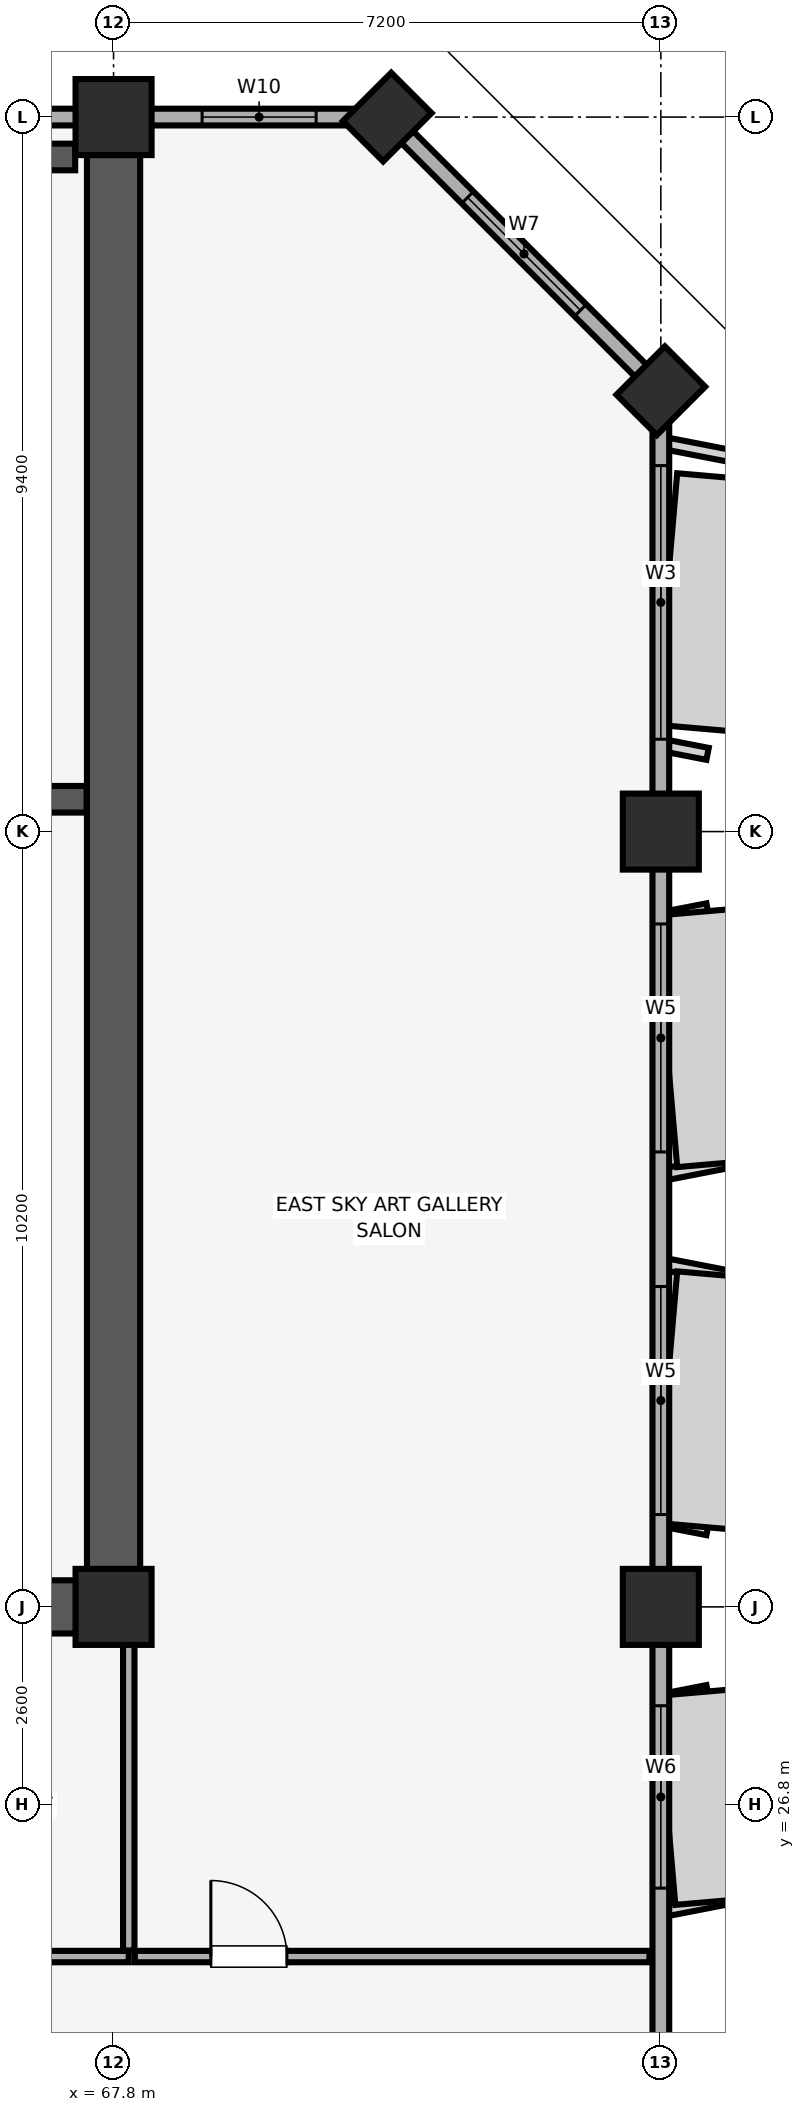
"""IFC4 building model, lengths in metres.
Left out: names, types, materials, properties, quantities, classifications, styles, units other than length and angle.
Written with IfcOpenShell. Run it as: python <this file> out.ifc"""

import sys

from ifc_helpers import new_model, si_unit, direction, frame, frame_2d, origin, origin_2d, place, context, subcontext, project, spatial, rectangle, extrude, element, fill, save


model = new_model("IFC4")
c1 = context("Model", 3, precision=1e-05, world=origin(), true_north=direction((0.0, 1.0)))
c2 = subcontext(c1, "Body", "Model", "MODEL_VIEW")
j1 = project(units=[si_unit("LENGTHUNIT", "METRE"), si_unit("PLANEANGLEUNIT", "RADIAN")], contexts=[c1])
p1 = place(None, origin())
s1 = spatial("IfcSite", under=j1, at=p1, CompositionType="ELEMENT")
p2 = place(p1, origin())
s2 = spatial("IfcBuilding", under=s1, at=p2, CompositionType="ELEMENT")
p3 = place(p2, frame((0.0, 0.0, 290.3)))
s3 = spatial("IfcBuildingStorey", under=s2, at=p3, CompositionType="ELEMENT", Elevation=290.3)
for number, where, z_axis, x_axis in (
    (1, (75.0, 29.4, 0.0), (0.0, 0.0, 1.0), (1.0, 0.0, 0.0)),
    (2, (75.0, 39.6, 0.0), (0.0, 0.0, 1.0), (1.0, 0.0, 0.0)),
):
    element("IfcColumn", number, at=place(p3, frame(where, z_axis=z_axis, x_axis=x_axis)), inside=s3, PredefinedType="COLUMN", context=c2, shape_type="SweptSolid", body=[
        extrude(rectangle(XDim=1.0, YDim=1.0, at=origin_2d()), origin(), (0.0, 0.0, 1.0), 4.02),
    ])
for number, where, z_axis, x_axis in (
    (3, (75.0, 45.4, 0.0), (0.0, 0.0, 1.0), (0.707, 0.707, 0.0)),
    (4, (71.4, 49.0, 0.0), (0.0, 0.0, 1.0), (0.707, 0.707, 0.0)),
):
    element("IfcColumn", number, at=place(p3, frame(where, z_axis=z_axis, x_axis=x_axis)), inside=s3, PredefinedType="PILASTER", context=c2, shape_type="SweptSolid", body=[
        extrude(rectangle(XDim=0.9, YDim=0.75, at=origin_2d()), origin(), (0.0, 0.0, 1.0), 4.02),
    ])
for number, where, z_axis, x_axis in (
    (5, (67.8, 29.4, 0.0), (0.0, 0.0, 1.0), (1.0, 0.0, 0.0)),
    (6, (67.8, 49.0, 0.0), (0.0, 0.0, 1.0), (1.0, 0.0, 0.0)),
):
    element("IfcColumn", number, at=place(p3, frame(where, z_axis=z_axis, x_axis=x_axis)), inside=s3, PredefinedType="COLUMN", context=c2, shape_type="SweptSolid", body=[
        extrude(rectangle(XDim=1.0, YDim=1.0, at=origin_2d()), origin(), (0.0, 0.0, 1.0), 4.02),
    ])
p4 = place(p3, frame((75.0, 10.6, 0.0), z_axis=(0.0, 0.0, 1.0), x_axis=(0.0, 1.0, 0.0)))
e7 = element("IfcWall", 7, at=p4, inside=s3, PredefinedType="SOLIDWALL", context=c2, shape_type="SweptSolid", body=[
    extrude(rectangle(XDim=34.8, YDim=0.22, at=frame_2d((17.4, 0.0))), origin(), (0.0, 0.0, 1.0), 3.22),
])
p5 = place(p4, frame((0.885, 0.0, 0.85)))
e8 = element("IfcOpeningElement", 8, at=p5, cuts=e7, PredefinedType="OPENING", context=c2, shape_type="SweptSolid", body=[
    extrude(rectangle(XDim=2.4, YDim=1.5, at=frame_2d((1.2, 0.75))), frame((0.0, 0.12, 0.0), z_axis=(0.0, -1.0, 0.0), x_axis=(1.0, 0.0, 0.0)), (0.0, 0.0, 1.0), 0.24),
])
p6 = place(p4, frame((6.7, 0.0, 0.85)))
e9 = element("IfcOpeningElement", 9, at=p6, cuts=e7, PredefinedType="OPENING", context=c2, shape_type="SweptSolid", body=[
    extrude(rectangle(XDim=3.6, YDim=1.65, at=frame_2d((1.8, 0.825))), frame((0.0, 0.12, 0.0), z_axis=(0.0, -1.0, 0.0), x_axis=(1.0, 0.0, 0.0)), (0.0, 0.0, 1.0), 0.24),
])
p7 = place(p4, frame((15.1, 0.0, 0.85)))
e10 = element("IfcOpeningElement", 10, at=p7, cuts=e7, PredefinedType="OPENING", context=c2, shape_type="SweptSolid", body=[
    extrude(rectangle(XDim=2.4, YDim=1.5, at=frame_2d((1.2, 0.75))), frame((0.0, 0.12, 0.0), z_axis=(0.0, -1.0, 0.0), x_axis=(1.0, 0.0, 0.0)), (0.0, 0.0, 1.0), 0.24),
])
p8 = place(p4, frame((20.015, 0.0, 0.85)))
e11 = element("IfcOpeningElement", 11, at=p8, cuts=e7, PredefinedType="OPENING", context=c2, shape_type="SweptSolid", body=[
    extrude(rectangle(XDim=3.0, YDim=1.5, at=frame_2d((1.5, 0.75))), frame((0.0, 0.12, 0.0), z_axis=(0.0, -1.0, 0.0), x_axis=(1.0, 0.0, 0.0)), (0.0, 0.0, 1.0), 0.24),
])
p9 = place(p4, frame((24.785, 0.0, 0.85)))
e12 = element("IfcOpeningElement", 12, at=p9, cuts=e7, PredefinedType="OPENING", context=c2, shape_type="SweptSolid", body=[
    extrude(rectangle(XDim=3.0, YDim=1.5, at=frame_2d((1.5, 0.75))), frame((0.0, 0.12, 0.0), z_axis=(0.0, -1.0, 0.0), x_axis=(1.0, 0.0, 0.0)), (0.0, 0.0, 1.0), 0.24),
])
p10 = place(p4, frame((30.215, 0.0, 0.85)))
e13 = element("IfcOpeningElement", 13, at=p10, cuts=e7, PredefinedType="OPENING", context=c2, shape_type="SweptSolid", body=[
    extrude(rectangle(XDim=3.6, YDim=1.65, at=frame_2d((1.8, 0.825))), frame((0.0, 0.12, 0.0), z_axis=(0.0, -1.0, 0.0), x_axis=(1.0, 0.0, 0.0)), (0.0, 0.0, 1.0), 0.24),
])
p11 = place(p3, frame((75.0, 45.4, 0.0), z_axis=(0.0, 0.0, 1.0), x_axis=(-0.707106781187, 0.707106781187, 0.0)))
e14 = element("IfcWall", 14, at=p11, inside=s3, PredefinedType="SOLIDWALL", context=c2, shape_type="SweptSolid", body=[
    extrude(rectangle(XDim=5.091, YDim=0.22, at=frame_2d((2.546, 0.0))), origin(), (0.0, 0.0, 1.0), 3.22),
])
p12 = place(p11, frame((1.496, 0.0, 0.85)))
e15 = element("IfcOpeningElement", 15, at=p12, cuts=e14, PredefinedType="OPENING", context=c2, shape_type="SweptSolid", body=[
    extrude(rectangle(XDim=2.1, YDim=1.6, at=frame_2d((1.05, 0.8))), frame((0.0, 0.12, 0.0), z_axis=(0.0, -1.0, 0.0), x_axis=(1.0, 0.0, 0.0)), (0.0, 0.0, 1.0), 0.24),
])
p13 = place(p3, frame((71.4, 49.0, 0.0), z_axis=(0.0, 0.0, 1.0), x_axis=(-1.0, 0.0, 0.0)))
e16 = element("IfcWall", 16, at=p13, inside=s3, PredefinedType="SOLIDWALL", context=c2, shape_type="SweptSolid", body=[
    extrude(rectangle(XDim=58.8, YDim=0.22, at=frame_2d((29.4, 0.0))), origin(), (0.0, 0.0, 1.0), 3.22),
])
p14 = place(p13, frame((56.365, 0.0, 0.85)))
e17 = element("IfcOpeningElement", 17, at=p14, cuts=e16, PredefinedType="OPENING", context=c2, shape_type="SweptSolid", body=[
    extrude(rectangle(XDim=1.5, YDim=1.4, at=frame_2d((0.75, 0.7))), frame((0.0, 0.12, 0.0), z_axis=(0.0, -1.0, 0.0), x_axis=(1.0, 0.0, 0.0)), (0.0, 0.0, 1.0), 0.24),
])
p15 = place(p13, frame((0.935, 0.0, 0.85)))
e18 = element("IfcOpeningElement", 18, at=p15, cuts=e16, PredefinedType="OPENING", context=c2, shape_type="SweptSolid", body=[
    extrude(rectangle(XDim=1.5, YDim=1.4, at=frame_2d((0.75, 0.7))), frame((0.0, 0.12, 0.0), z_axis=(0.0, -1.0, 0.0), x_axis=(1.0, 0.0, 0.0)), (0.0, 0.0, 1.0), 0.24),
])
p16 = place(p13, frame((41.915, 0.0, 0.9)))
e19 = element("IfcOpeningElement", 19, at=p16, cuts=e16, PredefinedType="OPENING", context=c2, shape_type="SweptSolid", body=[
    extrude(rectangle(XDim=3.6, YDim=1.5, at=frame_2d((1.8, 0.75))), frame((0.0, 0.12, 0.0), z_axis=(0.0, -1.0, 0.0), x_axis=(1.0, 0.0, 0.0)), (0.0, 0.0, 1.0), 0.24),
])
p17 = place(p13, frame((35.7, 0.0, 0.9)))
e20 = element("IfcOpeningElement", 20, at=p17, cuts=e16, PredefinedType="OPENING", context=c2, shape_type="SweptSolid", body=[
    extrude(rectangle(XDim=2.4, YDim=1.5, at=frame_2d((1.2, 0.75))), frame((0.0, 0.12, 0.0), z_axis=(0.0, -1.0, 0.0), x_axis=(1.0, 0.0, 0.0)), (0.0, 0.0, 1.0), 0.24),
])
p18 = place(p13, frame((18.95, 0.0, 0.9)))
e21 = element("IfcOpeningElement", 21, at=p18, cuts=e16, PredefinedType="OPENING", context=c2, shape_type="SweptSolid", body=[
    extrude(rectangle(XDim=3.0, YDim=1.5, at=frame_2d((1.5, 0.75))), frame((0.0, 0.12, 0.0), z_axis=(0.0, -1.0, 0.0), x_axis=(1.0, 0.0, 0.0)), (0.0, 0.0, 1.0), 0.24),
])
p19 = place(p13, frame((14.635, 0.0, 0.9)))
e22 = element("IfcOpeningElement", 22, at=p19, cuts=e16, PredefinedType="OPENING", context=c2, shape_type="SweptSolid", body=[
    extrude(rectangle(XDim=2.4, YDim=1.5, at=frame_2d((1.2, 0.75))), frame((0.0, 0.12, 0.0), z_axis=(0.0, -1.0, 0.0), x_axis=(1.0, 0.0, 0.0)), (0.0, 0.0, 1.0), 0.24),
])
p20 = place(p3, frame((67.8, 29.4, 0.0), z_axis=(0.0, 0.0, 1.0), x_axis=(0.0, 1.0, 0.0)))
e23 = element("IfcWall", 23, at=p20, inside=s3, PredefinedType="SHEAR", context=c2, shape_type="SweptSolid", body=[
    extrude(rectangle(XDim=19.2, YDim=0.7, at=frame_2d((9.6, 0.0))), origin(), (0.0, 0.0, 1.0), 4.02),
])
p21 = place(p3, frame((60.4, 29.4, 0.0), z_axis=(0.0, 0.0, 1.0), x_axis=(1.0, 0.0, 0.0)))
e24 = element("IfcWall", 24, at=p21, inside=s3, PredefinedType="SHEAR", context=c2, shape_type="SweptSolid", body=[
    extrude(rectangle(XDim=7.045, YDim=0.7, at=frame_2d((3.522, 0.0))), origin(), (0.0, 0.0, 1.0), 4.02),
])
p22 = place(p3, frame((63.145, 40.025, 0.0), z_axis=(0.0, 0.0, 1.0), x_axis=(1.0, 0.0, 0.0)))
e25 = element("IfcWall", 25, at=p22, inside=s3, PredefinedType="SHEAR", context=c2, shape_type="SweptSolid", body=[
    extrude(rectangle(XDim=4.3, YDim=0.35, at=frame_2d((2.15, 0.0))), origin(), (0.0, 0.0, 1.0), 4.02),
])
p23 = place(p22, frame((1.24, 0.0, 0.0)))
e26 = element("IfcOpeningElement", 26, at=p23, cuts=e25, PredefinedType="OPENING", context=c2, shape_type="SweptSolid", body=[
    extrude(rectangle(XDim=1.15, YDim=2.15, at=frame_2d((0.575, 1.075))), frame((0.0, 0.185, 0.0), z_axis=(0.0, -1.0, 0.0), x_axis=(1.0, 0.0, 0.0)), (0.0, 0.0, 1.0), 0.37),
])
p24 = place(p3, frame((63.145, 48.475, 0.0), z_axis=(0.0, 0.0, 1.0), x_axis=(1.0, 0.0, 0.0)))
e27 = element("IfcWall", 27, at=p24, inside=s3, PredefinedType="SHEAR", context=c2, shape_type="SweptSolid", body=[
    extrude(rectangle(XDim=4.15, YDim=0.35, at=frame_2d((2.075, 0.0))), origin(), (0.0, 0.0, 1.0), 4.02),
])
p25 = place(p3, frame((59.0, 24.8, 0.0), z_axis=(0.0, 0.0, 1.0), x_axis=(1.0, 0.0, 0.0)))
e28 = element("IfcWall", 28, at=p25, inside=s3, PredefinedType="PARTITIONING", context=c2, shape_type="SweptSolid", body=[
    extrude(rectangle(XDim=9.0, YDim=0.15, at=frame_2d((4.5, 0.0))), origin(), (0.0, 0.0, 1.0), 4.02),
])
p26 = place(p25, frame((4.0, 0.0, 0.0)))
e29 = element("IfcOpeningElement", 29, at=p26, cuts=e28, PredefinedType="OPENING", context=c2, shape_type="SweptSolid", body=[
    extrude(rectangle(XDim=1.0, YDim=2.15, at=frame_2d((0.5, 1.075))), frame((0.0, 0.085, 0.0), z_axis=(0.0, -1.0, 0.0), x_axis=(1.0, 0.0, 0.0)), (0.0, 0.0, 1.0), 0.17),
])
p27 = place(p3, frame((68.0, 24.88, 0.0), z_axis=(0.0, 0.0, 1.0), x_axis=(0.0, 1.0, 0.0)))
e30 = element("IfcWall", 30, at=p27, inside=s3, PredefinedType="PARTITIONING", context=c2, shape_type="SweptSolid", body=[
    extrude(rectangle(XDim=4.51, YDim=0.15, at=frame_2d((2.255, 0.0))), origin(), (0.0, 0.0, 1.0), 3.66),
])
p28 = place(p3, frame((68.08, 24.8, 0.0), z_axis=(0.0, 0.0, 1.0), x_axis=(1.0, 0.0, 0.0)))
e31 = element("IfcWall", 31, at=p28, inside=s3, PredefinedType="PARTITIONING", context=c2, shape_type="SweptSolid", body=[
    extrude(rectangle(XDim=6.77, YDim=0.15, at=frame_2d((3.385, 0.0))), origin(), (0.0, 0.0, 1.0), 4.02),
])
p29 = place(p28, frame((1.0, 0.0, 0.0)))
e32 = element("IfcOpeningElement", 32, at=p29, cuts=e31, PredefinedType="OPENING", context=c2, shape_type="SweptSolid", body=[
    extrude(rectangle(XDim=1.0, YDim=2.15, at=frame_2d((0.5, 1.075))), frame((0.0, 0.085, 0.0), z_axis=(0.0, -1.0, 0.0), x_axis=(1.0, 0.0, 0.0)), (0.0, 0.0, 1.0), 0.17),
])
p30 = place(p12, origin())
e33 = element("IfcWindow", 33, at=p30, inside=s3, PartitioningType="SINGLE_PANEL", PredefinedType="WINDOW", context=c2, shape_type="SweptSolid", body=[
    extrude(rectangle(XDim=2.1, YDim=1.6, at=frame_2d((1.05, 0.8))), frame((0.0, 0.03, 0.0), z_axis=(0.0, -1.0, 0.0), x_axis=(1.0, 0.0, 0.0)), (0.0, 0.0, 1.0), 0.06),
])
fill(e15, e33)
p31 = place(p7, origin())
e34 = element("IfcWindow", 34, at=p31, inside=s3, PartitioningType="SINGLE_PANEL", PredefinedType="WINDOW", context=c2, shape_type="SweptSolid", body=[
    extrude(rectangle(XDim=2.4, YDim=1.5, at=frame_2d((1.2, 0.75))), frame((0.0, 0.03, 0.0), z_axis=(0.0, -1.0, 0.0), x_axis=(1.0, 0.0, 0.0)), (0.0, 0.0, 1.0), 0.06),
])
fill(e10, e34)
p32 = place(p8, origin())
e35 = element("IfcWindow", 35, at=p32, inside=s3, PartitioningType="SINGLE_PANEL", PredefinedType="WINDOW", context=c2, shape_type="SweptSolid", body=[
    extrude(rectangle(XDim=3.0, YDim=1.5, at=frame_2d((1.5, 0.75))), frame((0.0, 0.03, 0.0), z_axis=(0.0, -1.0, 0.0), x_axis=(1.0, 0.0, 0.0)), (0.0, 0.0, 1.0), 0.06),
])
fill(e11, e35)
p33 = place(p9, origin())
e36 = element("IfcWindow", 36, at=p33, inside=s3, PartitioningType="SINGLE_PANEL", PredefinedType="WINDOW", context=c2, shape_type="SweptSolid", body=[
    extrude(rectangle(XDim=3.0, YDim=1.5, at=frame_2d((1.5, 0.75))), frame((0.0, 0.03, 0.0), z_axis=(0.0, -1.0, 0.0), x_axis=(1.0, 0.0, 0.0)), (0.0, 0.0, 1.0), 0.06),
])
fill(e12, e36)
p34 = place(p10, origin())
e37 = element("IfcWindow", 37, at=p34, inside=s3, PartitioningType="SINGLE_PANEL", PredefinedType="WINDOW", context=c2, shape_type="SweptSolid", body=[
    extrude(rectangle(XDim=3.6, YDim=1.65, at=frame_2d((1.8, 0.825))), frame((0.0, 0.03, 0.0), z_axis=(0.0, -1.0, 0.0), x_axis=(1.0, 0.0, 0.0)), (0.0, 0.0, 1.0), 0.06),
])
fill(e13, e37)
p35 = place(p15, origin())
e38 = element("IfcWindow", 38, at=p35, inside=s3, PartitioningType="SINGLE_PANEL", PredefinedType="WINDOW", context=c2, shape_type="SweptSolid", body=[
    extrude(rectangle(XDim=1.5, YDim=1.4, at=frame_2d((0.75, 0.7))), frame((0.0, 0.03, 0.0), z_axis=(0.0, -1.0, 0.0), x_axis=(1.0, 0.0, 0.0)), (0.0, 0.0, 1.0), 0.06),
])
fill(e18, e38)
p36 = place(p29, origin())
e39 = element("IfcDoor", 39, at=p36, inside=s3, OperationType="SINGLE_SWING_LEFT", PredefinedType="DOOR", context=c2, shape_type="SweptSolid", body=[
    extrude(rectangle(XDim=1.0, YDim=2.15, at=frame_2d((0.5, 1.075))), frame((0.0, 0.025, 0.0), z_axis=(0.0, -1.0, 0.0), x_axis=(1.0, 0.0, 0.0)), (0.0, 0.0, 1.0), 0.05),
])
fill(e32, e39)
save(model, sys.argv[1])
